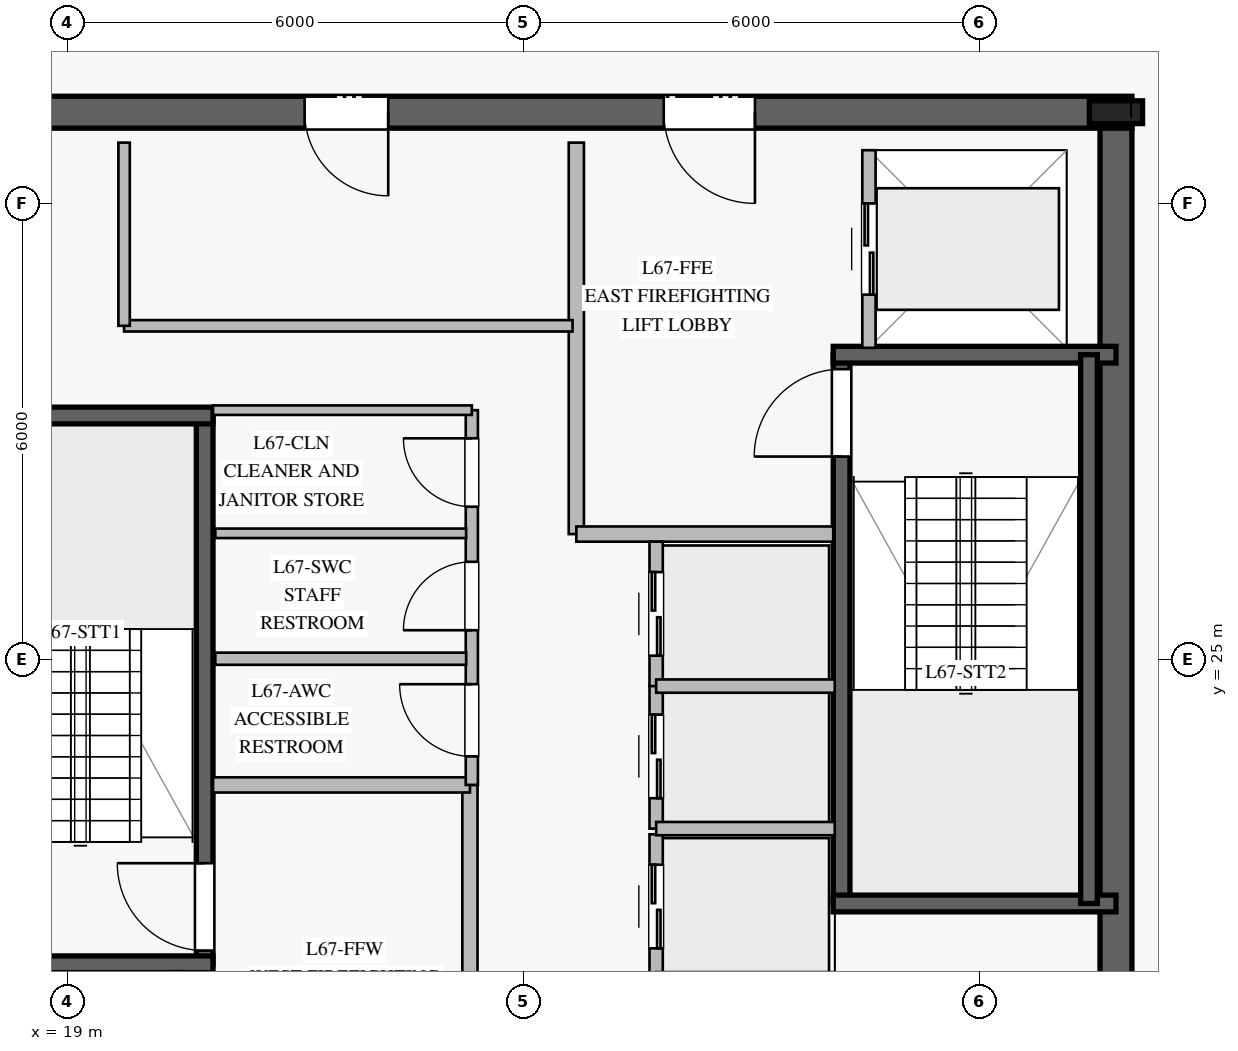
"""IFC4 building model, lengths in metres.
Left out: names, types, materials, properties, quantities, classifications, styles, units other than length and angle.
Written with IfcOpenShell. Run it as: python <this file> out.ifc"""

import sys

from ifc_helpers import new_model, si_unit, direction, frame, frame_2d, origin, origin_2d, place, context, subcontext, project, spatial, rectangle, i_section, extrude, element, fill, save


model = new_model("IFC4")
c1 = context("Model", 3, precision=1e-05, world=origin(), true_north=direction((0.0, 1.0)))
c2 = subcontext(c1, "Body", "Model", "MODEL_VIEW")
j1 = project(units=[si_unit("LENGTHUNIT", "METRE"), si_unit("PLANEANGLEUNIT", "RADIAN")], contexts=[c1])
p1 = place(None, origin())
s1 = spatial("IfcSite", under=j1, at=p1, CompositionType="ELEMENT")
p2 = place(p1, origin())
s2 = spatial("IfcBuilding", under=s1, at=p2, CompositionType="ELEMENT")
p3 = place(p2, frame((0.0, 0.0, 278.2)))
s3 = spatial("IfcBuildingStorey", under=s2, at=p3, CompositionType="ELEMENT", Elevation=278.2)
p4 = place(p3, frame((33.01, 32.2, 0.0), z_axis=(0.0, 0.0, 1.0), x_axis=(-1.0, 0.0, 0.0)))
e1 = element("IfcWall", 1, at=p4, inside=s3, PredefinedType="SHEAR", context=c2, shape_type="SweptSolid", body=[
    extrude(rectangle(XDim=16.02, YDim=0.42, at=frame_2d((8.01, 0.0))), origin(), (0.0, 0.0, 1.0), 3.78),
])
p5 = place(p4, frame((4.96, 0.0, 0.0)))
e2 = element("IfcOpeningElement", 2, at=p5, cuts=e1, PredefinedType="OPENING", context=c2, shape_type="SweptSolid", body=[
    extrude(rectangle(XDim=1.2, YDim=2.25, at=frame_2d((0.6, 1.125))), frame((0.0, 0.22, 0.0), z_axis=(0.0, -1.0, 0.0), x_axis=(1.0, 0.0, 0.0)), (0.0, 0.0, 1.0), 0.44),
])
p6 = place(p4, frame((9.785, 0.0, 0.0)))
e3 = element("IfcOpeningElement", 3, at=p6, cuts=e1, PredefinedType="OPENING", context=c2, shape_type="SweptSolid", body=[
    extrude(rectangle(XDim=1.1, YDim=2.2, at=frame_2d((0.55, 1.1))), frame((0.0, 0.22, 0.0), z_axis=(0.0, -1.0, 0.0), x_axis=(1.0, 0.0, 0.0)), (0.0, 0.0, 1.0), 0.44),
])
p7 = place(p3, frame((32.8, 18.01, 0.0), z_axis=(0.0, 0.0, 1.0), x_axis=(0.0, 1.0, 0.0)))
e4 = element("IfcWall", 4, at=p7, inside=s3, PredefinedType="SHEAR", context=c2, shape_type="SweptSolid", body=[
    extrude(rectangle(XDim=13.98, YDim=0.42, at=frame_2d((6.99, 0.0))), origin(), (0.0, 0.0, 1.0), 3.78),
])
p8 = place(p3, frame((32.8, 32.2, 0.0), z_axis=(0.0, 0.0, 1.0), x_axis=(1.0, 0.0, 0.0)))
e5 = element("IfcColumn", 5, at=p8, inside=s3, PredefinedType="COLUMN", context=c2, shape_type="SweptSolid", body=[
    extrude(i_section(OverallWidth=0.3, OverallDepth=0.7, WebThickness=0.017, FlangeThickness=0.032, at=origin_2d()), origin(), (0.0, 0.0, 1.0), 4.0),
])
p9 = place(p3, frame((20.81, 20.99, 0.0), z_axis=(0.0, 0.0, 1.0), x_axis=(0.0, 1.0, 0.0)))
e6 = element("IfcWall", 6, at=p9, inside=s3, PredefinedType="SOLIDWALL", context=c2, shape_type="SweptSolid", body=[
    extrude(rectangle(XDim=7.22, YDim=0.22, at=frame_2d((3.61, 0.0))), origin(), (0.0, 0.0, 1.0), 3.78),
])
p10 = place(p9, frame((0.18, 0.0, 0.0)))
e7 = element("IfcOpeningElement", 7, at=p10, cuts=e6, PredefinedType="OPENING", context=c2, shape_type="SweptSolid", body=[
    extrude(rectangle(XDim=1.15, YDim=2.2, at=frame_2d((0.575, 1.1))), frame((0.0, 0.12, 0.0), z_axis=(0.0, -1.0, 0.0), x_axis=(1.0, 0.0, 0.0)), (0.0, 0.0, 1.0), 0.24),
])
for number, where, z_axis, x_axis in (
    (8, (17.2, 20.99, 0.0), (0.0, 0.0, 1.0), (1.0, 0.0, 0.0)),
    (9, (17.2, 28.21, 0.0), (0.0, 0.0, 1.0), (1.0, 0.0, 0.0)),
):
    element("IfcWall", number, at=place(p3, frame(where, z_axis=z_axis, x_axis=x_axis)), inside=s3, PredefinedType="SOLIDWALL", context=c2, shape_type="SweptSolid", body=[
        extrude(rectangle(XDim=3.72, YDim=0.22, at=frame_2d((1.86, 0.0))), origin(), (0.0, 0.0, 1.0), 3.78),
    ])
p11 = place(p3, frame((29.19, 21.79, 0.0), z_axis=(0.0, 0.0, 1.0), x_axis=(0.0, 1.0, 0.0)))
e10 = element("IfcWall", 10, at=p11, inside=s3, PredefinedType="SOLIDWALL", context=c2, shape_type="SweptSolid", body=[
    extrude(rectangle(XDim=7.22, YDim=0.22, at=frame_2d((3.61, 0.0))), origin(), (0.0, 0.0, 1.0), 3.78),
])
p12 = place(p11, frame((5.88, 0.0, 0.0)))
e11 = element("IfcOpeningElement", 11, at=p12, cuts=e10, PredefinedType="OPENING", context=c2, shape_type="SweptSolid", body=[
    extrude(rectangle(XDim=1.15, YDim=2.2, at=frame_2d((0.575, 1.1))), frame((0.0, 0.12, 0.0), z_axis=(0.0, -1.0, 0.0), x_axis=(1.0, 0.0, 0.0)), (0.0, 0.0, 1.0), 0.24),
])
for number, where, z_axis, x_axis in (
    (12, (29.08, 21.79, 0.0), (0.0, 0.0, 1.0), (1.0, 0.0, 0.0)),
    (13, (29.08, 29.01, 0.0), (0.0, 0.0, 1.0), (1.0, 0.0, 0.0)),
):
    element("IfcWall", number, at=place(p3, frame(where, z_axis=z_axis, x_axis=x_axis)), inside=s3, PredefinedType="SOLIDWALL", context=c2, shape_type="SweptSolid", body=[
        extrude(rectangle(XDim=3.72, YDim=0.22, at=frame_2d((1.86, 0.0))), origin(), (0.0, 0.0, 1.0), 3.78),
    ])
p13 = place(p3, frame((32.445, 29.01, 0.0), z_axis=(0.0, 0.0, 1.0), x_axis=(0.0, -1.0, 0.0)))
e14 = element("IfcWall", 14, at=p13, inside=s3, PredefinedType="SOLIDWALL", context=c2, shape_type="SweptSolid", body=[
    extrude(rectangle(XDim=7.22, YDim=0.22, at=frame_2d((3.61, 0.0))), origin(), (0.0, 0.0, 1.0), 3.78),
])
p14 = place(p3, frame((24.3, 18.2, 0.0), z_axis=(0.0, 0.0, 1.0), x_axis=(0.0, 1.0, 0.0)))
e15 = element("IfcWall", 15, at=p14, inside=s3, PredefinedType="PARTITIONING", context=c2, shape_type="SweptSolid", body=[
    extrude(rectangle(XDim=5.15, YDim=0.2, at=frame_2d((2.575, 0.0))), origin(), (0.0, 0.0, 1.0), 3.78),
])
p15 = place(p3, frame((20.92, 23.35, 0.0), z_axis=(0.0, 0.0, 1.0), x_axis=(1.0, 0.0, 0.0)))
e16 = element("IfcWall", 16, at=p15, inside=s3, PredefinedType="PARTITIONING", context=c2, shape_type="SweptSolid", body=[
    extrude(rectangle(XDim=3.38, YDim=0.2, at=frame_2d((1.69, 0.0))), origin(), (0.0, 0.0, 1.0), 3.78),
])
p16 = place(p3, frame((25.7, 26.65, 0.0), z_axis=(0.0, 0.0, 1.0), x_axis=(0.0, 1.0, 0.0)))
e17 = element("IfcWall", 17, at=p16, inside=s3, PredefinedType="PARTITIONING", context=c2, shape_type="SweptSolid", body=[
    extrude(rectangle(XDim=5.15, YDim=0.2, at=frame_2d((2.575, 0.0))), origin(), (0.0, 0.0, 1.0), 3.78),
])
p17 = place(p3, frame((25.7, 26.65, 0.0), z_axis=(0.0, 0.0, 1.0), x_axis=(1.0, 0.0, 0.0)))
e18 = element("IfcWall", 18, at=p17, inside=s3, PredefinedType="PARTITIONING", context=c2, shape_type="SweptSolid", body=[
    extrude(rectangle(XDim=3.38, YDim=0.2, at=frame_2d((1.69, 0.0))), origin(), (0.0, 0.0, 1.0), 3.78),
])
p18 = place(p3, frame((24.325, 23.35, 0.0), z_axis=(0.0, 0.0, 1.0), x_axis=(0.0, 1.0, 0.0)))
e19 = element("IfcWall", 19, at=p18, inside=s3, PredefinedType="PLUMBINGWALL", context=c2, shape_type="SweptSolid", body=[
    extrude(rectangle(XDim=4.93, YDim=0.16, at=frame_2d((2.465, 0.0))), origin(), (0.0, 0.0, 1.0), 3.78),
])
p19 = place(p18, frame((0.375, 0.0, 0.0)))
e20 = element("IfcOpeningElement", 20, at=p19, cuts=e19, PredefinedType="OPENING", context=c2, shape_type="SweptSolid", body=[
    extrude(rectangle(XDim=0.95, YDim=2.1, at=frame_2d((0.475, 1.05))), frame((0.0, 0.09, 0.0), z_axis=(0.0, -1.0, 0.0), x_axis=(1.0, 0.0, 0.0)), (0.0, 0.0, 1.0), 0.18),
])
p20 = place(p18, frame((2.035, 0.0, 0.0)))
e21 = element("IfcOpeningElement", 21, at=p20, cuts=e19, PredefinedType="OPENING", context=c2, shape_type="SweptSolid", body=[
    extrude(rectangle(XDim=0.9, YDim=2.1, at=frame_2d((0.45, 1.05))), frame((0.0, 0.09, 0.0), z_axis=(0.0, -1.0, 0.0), x_axis=(1.0, 0.0, 0.0)), (0.0, 0.0, 1.0), 0.18),
])
p21 = place(p18, frame((3.66, 0.0, 0.0)))
e22 = element("IfcOpeningElement", 22, at=p21, cuts=e19, PredefinedType="OPENING", context=c2, shape_type="SweptSolid", body=[
    extrude(rectangle(XDim=0.9, YDim=2.1, at=frame_2d((0.45, 1.05))), frame((0.0, 0.09, 0.0), z_axis=(0.0, -1.0, 0.0), x_axis=(1.0, 0.0, 0.0)), (0.0, 0.0, 1.0), 0.18),
])
p22 = place(p3, frame((20.92, 28.28, 0.0), z_axis=(0.0, 0.0, 1.0), x_axis=(1.0, 0.0, 0.0)))
e23 = element("IfcWall", 23, at=p22, inside=s3, PredefinedType="PARTITIONING", context=c2, shape_type="SweptSolid", body=[
    extrude(rectangle(XDim=3.405, YDim=0.125, at=frame_2d((1.703, 0.0))), origin(), (0.0, 0.0, 1.0), 3.78),
])
p23 = place(p3, frame((20.95, 25.01, 0.0), z_axis=(0.0, 0.0, 1.0), x_axis=(1.0, 0.0, 0.0)))
e24 = element("IfcWall", 24, at=p23, inside=s3, PredefinedType="PLUMBINGWALL", context=c2, shape_type="SweptSolid", body=[
    extrude(rectangle(XDim=3.3, YDim=0.16, at=frame_2d((1.65, 0.0))), origin(), (0.0, 0.0, 1.0), 3.78),
])
p24 = place(p3, frame((20.95, 26.66, 0.0), z_axis=(0.0, 0.0, 1.0), x_axis=(1.0, 0.0, 0.0)))
e25 = element("IfcWall", 25, at=p24, inside=s3, PredefinedType="PARTITIONING", context=c2, shape_type="SweptSolid", body=[
    extrude(rectangle(XDim=3.3, YDim=0.125, at=frame_2d((1.65, 0.0))), origin(), (0.0, 0.0, 1.0), 3.78),
])
p25 = place(p3, frame((19.75, 29.39, 0.0), z_axis=(0.0, 0.0, 1.0), x_axis=(1.0, 0.0, 0.0)))
e26 = element("IfcWall", 26, at=p25, inside=s3, PredefinedType="PARTITIONING", context=c2, shape_type="SweptSolid", body=[
    extrude(rectangle(XDim=5.9, YDim=0.15, at=frame_2d((2.95, 0.0))), origin(), (0.0, 0.0, 1.0), 3.78),
])
p26 = place(p3, frame((19.75, 29.39, 0.0), z_axis=(0.0, 0.0, 1.0), x_axis=(0.0, 1.0, 0.0)))
e27 = element("IfcWall", 27, at=p26, inside=s3, PredefinedType="PARTITIONING", context=c2, shape_type="SweptSolid", body=[
    extrude(rectangle(XDim=2.41, YDim=0.15, at=frame_2d((1.205, 0.0))), origin(), (0.0, 0.0, 1.0), 3.78),
])
p27 = place(p3, frame((26.75, 20.8, 0.0), z_axis=(0.0, 0.0, 1.0), x_axis=(0.0, 1.0, 0.0)))
e28 = element("IfcWall", 28, at=p27, inside=s3, PredefinedType="PARTITIONING", context=c2, shape_type="SweptSolid", body=[
    extrude(rectangle(XDim=1.9, YDim=0.175, at=frame_2d((0.95, 0.0))), origin(), (0.0, 0.0, 1.0), 3.78),
])
p28 = place(p27, frame((0.4, 0.0, 0.0)))
e29 = element("IfcOpeningElement", 29, at=p28, cuts=e28, PredefinedType="OPENING", context=c2, shape_type="SweptSolid", body=[
    extrude(rectangle(XDim=1.1, YDim=2.2, at=frame_2d((0.55, 1.1))), frame((0.0, 0.098, 0.0), z_axis=(0.0, -1.0, 0.0), x_axis=(1.0, 0.0, 0.0)), (0.0, 0.0, 1.0), 0.195),
])
p29 = place(p3, frame((26.75, 22.775, 0.0), z_axis=(0.0, 0.0, 1.0), x_axis=(0.0, 1.0, 0.0)))
e30 = element("IfcWall", 30, at=p29, inside=s3, PredefinedType="PARTITIONING", context=c2, shape_type="SweptSolid", body=[
    extrude(rectangle(XDim=1.9, YDim=0.175, at=frame_2d((0.95, 0.0))), origin(), (0.0, 0.0, 1.0), 3.78),
])
p30 = place(p29, frame((0.4, 0.0, 0.0)))
e31 = element("IfcOpeningElement", 31, at=p30, cuts=e30, PredefinedType="OPENING", context=c2, shape_type="SweptSolid", body=[
    extrude(rectangle(XDim=1.1, YDim=2.2, at=frame_2d((0.55, 1.1))), frame((0.0, 0.098, 0.0), z_axis=(0.0, -1.0, 0.0), x_axis=(1.0, 0.0, 0.0)), (0.0, 0.0, 1.0), 0.195),
])
p31 = place(p3, frame((26.75, 22.775, 0.0), z_axis=(0.0, 0.0, 1.0), x_axis=(1.0, 0.0, 0.0)))
e32 = element("IfcWall", 32, at=p31, inside=s3, PredefinedType="PARTITIONING", context=c2, shape_type="SweptSolid", body=[
    extrude(rectangle(XDim=2.35, YDim=0.175, at=frame_2d((1.175, 0.0))), origin(), (0.0, 0.0, 1.0), 3.78),
])
p32 = place(p3, frame((26.75, 24.65, 0.0), z_axis=(0.0, 0.0, 1.0), x_axis=(0.0, 1.0, 0.0)))
e33 = element("IfcWall", 33, at=p32, inside=s3, PredefinedType="PARTITIONING", context=c2, shape_type="SweptSolid", body=[
    extrude(rectangle(XDim=1.9, YDim=0.175, at=frame_2d((0.95, 0.0))), origin(), (0.0, 0.0, 1.0), 3.78),
])
p33 = place(p32, frame((0.4, 0.0, 0.0)))
e34 = element("IfcOpeningElement", 34, at=p33, cuts=e33, PredefinedType="OPENING", context=c2, shape_type="SweptSolid", body=[
    extrude(rectangle(XDim=1.1, YDim=2.2, at=frame_2d((0.55, 1.1))), frame((0.0, 0.098, 0.0), z_axis=(0.0, -1.0, 0.0), x_axis=(1.0, 0.0, 0.0)), (0.0, 0.0, 1.0), 0.195),
])
p34 = place(p3, frame((26.75, 24.65, 0.0), z_axis=(0.0, 0.0, 1.0), x_axis=(1.0, 0.0, 0.0)))
e35 = element("IfcWall", 35, at=p34, inside=s3, PredefinedType="PARTITIONING", context=c2, shape_type="SweptSolid", body=[
    extrude(rectangle(XDim=2.35, YDim=0.175, at=frame_2d((1.175, 0.0))), origin(), (0.0, 0.0, 1.0), 3.78),
])
p35 = place(p3, frame((29.55, 29.1, 0.0), z_axis=(0.0, 0.0, 1.0), x_axis=(0.0, 1.0, 0.0)))
e36 = element("IfcWall", 36, at=p35, inside=s3, PredefinedType="PARTITIONING", context=c2, shape_type="SweptSolid", body=[
    extrude(rectangle(XDim=2.6, YDim=0.175, at=frame_2d((1.3, 0.0))), origin(), (0.0, 0.0, 1.0), 3.78),
])
p36 = place(p35, frame((0.7, 0.0, 0.0)))
e37 = element("IfcOpeningElement", 37, at=p36, cuts=e36, PredefinedType="OPENING", context=c2, shape_type="SweptSolid", body=[
    extrude(rectangle(XDim=1.2, YDim=2.2, at=frame_2d((0.6, 1.1))), frame((0.0, 0.098, 0.0), z_axis=(0.0, -1.0, 0.0), x_axis=(1.0, 0.0, 0.0)), (0.0, 0.0, 1.0), 0.195),
])
p37 = place(p10, origin())
e38 = element("IfcDoor", 38, at=p37, inside=s3, OperationType="SINGLE_SWING_RIGHT", PredefinedType="DOOR", context=c2, shape_type="SweptSolid", body=[
    extrude(rectangle(XDim=1.15, YDim=2.2, at=frame_2d((0.575, 1.1))), frame((0.0, 0.025, 0.0), z_axis=(0.0, -1.0, 0.0), x_axis=(1.0, 0.0, 0.0)), (0.0, 0.0, 1.0), 0.05),
])
fill(e7, e38)
p38 = place(p12, origin())
e39 = element("IfcDoor", 39, at=p38, inside=s3, OperationType="SINGLE_SWING_LEFT", PredefinedType="DOOR", context=c2, shape_type="SweptSolid", body=[
    extrude(rectangle(XDim=1.15, YDim=2.2, at=frame_2d((0.575, 1.1))), frame((0.0, 0.025, 0.0), z_axis=(0.0, -1.0, 0.0), x_axis=(1.0, 0.0, 0.0)), (0.0, 0.0, 1.0), 0.05),
])
fill(e11, e39)
p39 = place(p5, origin())
e40 = element("IfcDoor", 40, at=p39, inside=s3, OperationType="SINGLE_SWING_LEFT", PredefinedType="DOOR", context=c2, shape_type="SweptSolid", body=[
    extrude(rectangle(XDim=1.2, YDim=2.25, at=frame_2d((0.6, 1.125))), frame((0.0, 0.025, 0.0), z_axis=(0.0, -1.0, 0.0), x_axis=(1.0, 0.0, 0.0)), (0.0, 0.0, 1.0), 0.05),
])
fill(e2, e40)
p40 = place(p19, origin())
e41 = element("IfcDoor", 41, at=p40, inside=s3, OperationType="SINGLE_SWING_RIGHT", PredefinedType="DOOR", context=c2, shape_type="SweptSolid", body=[
    extrude(rectangle(XDim=0.95, YDim=2.1, at=frame_2d((0.475, 1.05))), frame((0.0, 0.025, 0.0), z_axis=(0.0, -1.0, 0.0), x_axis=(1.0, 0.0, 0.0)), (0.0, 0.0, 1.0), 0.05),
])
fill(e20, e41)
p41 = place(p20, origin())
e42 = element("IfcDoor", 42, at=p41, inside=s3, OperationType="SINGLE_SWING_LEFT", PredefinedType="DOOR", context=c2, shape_type="SweptSolid", body=[
    extrude(rectangle(XDim=0.9, YDim=2.1, at=frame_2d((0.45, 1.05))), frame((0.0, 0.025, 0.0), z_axis=(0.0, -1.0, 0.0), x_axis=(1.0, 0.0, 0.0)), (0.0, 0.0, 1.0), 0.05),
])
fill(e21, e42)
p42 = place(p21, origin())
e43 = element("IfcDoor", 43, at=p42, inside=s3, OperationType="SINGLE_SWING_RIGHT", PredefinedType="DOOR", context=c2, shape_type="SweptSolid", body=[
    extrude(rectangle(XDim=0.9, YDim=2.1, at=frame_2d((0.45, 1.05))), frame((0.0, 0.025, 0.0), z_axis=(0.0, -1.0, 0.0), x_axis=(1.0, 0.0, 0.0)), (0.0, 0.0, 1.0), 0.05),
])
fill(e22, e43)
p43 = place(p6, origin())
e44 = element("IfcDoor", 44, at=p43, inside=s3, OperationType="SINGLE_SWING_LEFT", PredefinedType="DOOR", context=c2, shape_type="SweptSolid", body=[
    extrude(rectangle(XDim=1.1, YDim=2.2, at=frame_2d((0.55, 1.1))), frame((0.0, 0.025, 0.0), z_axis=(0.0, -1.0, 0.0), x_axis=(1.0, 0.0, 0.0)), (0.0, 0.0, 1.0), 0.05),
])
fill(e3, e44)
p44 = place(p28, origin())
e45 = element("IfcDoor", 45, at=p44, inside=s3, OperationType="DOUBLE_DOOR_SLIDING", PredefinedType="DOOR", context=c2, shape_type="SweptSolid", body=[
    extrude(rectangle(XDim=1.1, YDim=2.2, at=frame_2d((0.55, 1.1))), frame((0.0, 0.025, 0.0), z_axis=(0.0, -1.0, 0.0), x_axis=(1.0, 0.0, 0.0)), (0.0, 0.0, 1.0), 0.05),
])
fill(e29, e45)
p45 = place(p30, origin())
e46 = element("IfcDoor", 46, at=p45, inside=s3, OperationType="DOUBLE_DOOR_SLIDING", PredefinedType="DOOR", context=c2, shape_type="SweptSolid", body=[
    extrude(rectangle(XDim=1.1, YDim=2.2, at=frame_2d((0.55, 1.1))), frame((0.0, 0.025, 0.0), z_axis=(0.0, -1.0, 0.0), x_axis=(1.0, 0.0, 0.0)), (0.0, 0.0, 1.0), 0.05),
])
fill(e31, e46)
p46 = place(p33, origin())
e47 = element("IfcDoor", 47, at=p46, inside=s3, OperationType="DOUBLE_DOOR_SLIDING", PredefinedType="DOOR", context=c2, shape_type="SweptSolid", body=[
    extrude(rectangle(XDim=1.1, YDim=2.2, at=frame_2d((0.55, 1.1))), frame((0.0, 0.025, 0.0), z_axis=(0.0, -1.0, 0.0), x_axis=(1.0, 0.0, 0.0)), (0.0, 0.0, 1.0), 0.05),
])
fill(e34, e47)
p47 = place(p36, origin())
e48 = element("IfcDoor", 48, at=p47, inside=s3, OperationType="DOUBLE_DOOR_SLIDING", PredefinedType="DOOR", context=c2, shape_type="SweptSolid", body=[
    extrude(rectangle(XDim=1.2, YDim=2.2, at=frame_2d((0.6, 1.1))), frame((0.0, 0.025, 0.0), z_axis=(0.0, -1.0, 0.0), x_axis=(1.0, 0.0, 0.0)), (0.0, 0.0, 1.0), 0.05),
])
fill(e37, e48)
save(model, sys.argv[1])
